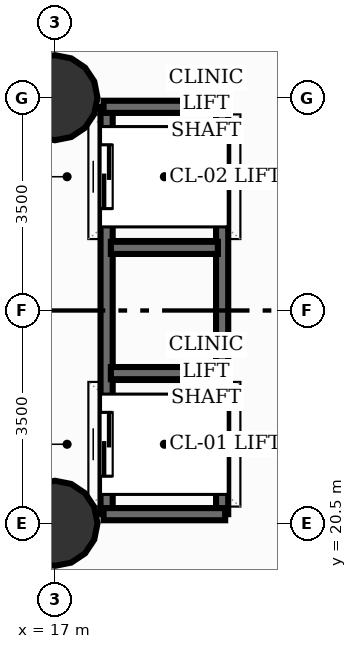
"""IFC4 building model, lengths in metres.
Left out: names, types, materials, properties, quantities, classifications, styles, units other than length and angle.
Written with IfcOpenShell. Run it as: python <this file> out.ifc"""

import sys

from ifc_helpers import new_model, si_unit, direction, frame, frame_2d, origin, origin_2d, place, context, subcontext, project, spatial, rectangle, circle, extrude, element, fill, save


model = new_model("IFC4")
c1 = context("Model", 3, precision=1e-05, world=origin(), true_north=direction((0.0, 1.0)))
c2 = subcontext(c1, "Body", "Model", "MODEL_VIEW")
j1 = project(units=[si_unit("LENGTHUNIT", "METRE"), si_unit("PLANEANGLEUNIT", "RADIAN")], contexts=[c1])
p1 = place(None, origin())
s1 = spatial("IfcSite", under=j1, at=p1, CompositionType="ELEMENT")
p2 = place(p1, origin())
s2 = spatial("IfcBuilding", under=s1, at=p2, CompositionType="ELEMENT")
p3 = place(p2, frame((0.0, 0.0, -9.0)))
s3 = spatial("IfcBuildingStorey", under=s2, at=p3, CompositionType="ELEMENT", Elevation=-9.0)
for number, where, z_axis, x_axis in (
    (1, (17.0, 20.5, 0.0), (0.0, 0.0, 1.0), (1.0, 0.0, 0.0)),
    (2, (17.0, 27.5, 0.0), (0.0, 0.0, 1.0), (1.0, 0.0, 0.0)),
):
    element("IfcColumn", number, at=place(p3, frame(where, z_axis=z_axis, x_axis=x_axis)), inside=s3, PredefinedType="COLUMN", context=c2, shape_type="SweptSolid", body=[
        extrude(circle(Radius=0.7, at=origin_2d()), origin(), (0.0, 0.0, 1.0), 4.5),
    ])
p4 = place(p3, frame((17.85, 20.65, 0.0), z_axis=(0.0, 0.0, 1.0), x_axis=(0.0, 1.0, 0.0)))
e3 = element("IfcWall", 3, at=p4, inside=s3, PredefinedType="SHEAR", context=c2, shape_type="SweptSolid", body=[
    extrude(rectangle(XDim=6.7, YDim=0.2, at=frame_2d((3.35, 0.0))), origin(), (0.0, 0.0, 1.0), 4.5),
])
p5 = place(p4, frame((0.625, 0.0, 0.0)))
e4 = element("IfcOpeningElement", 4, at=p5, cuts=e3, PredefinedType="OPENING", context=c2, shape_type="SweptSolid", body=[
    extrude(rectangle(XDim=1.05, YDim=2.15, at=frame_2d((0.525, 1.075))), frame((0.0, 0.11, 0.0), z_axis=(0.0, -1.0, 0.0), x_axis=(1.0, 0.0, 0.0)), (0.0, 0.0, 1.0), 0.22),
])
p6 = place(p4, frame((5.025, 0.0, 0.0)))
e5 = element("IfcOpeningElement", 5, at=p6, cuts=e3, PredefinedType="OPENING", context=c2, shape_type="SweptSolid", body=[
    extrude(rectangle(XDim=1.05, YDim=2.15, at=frame_2d((0.525, 1.075))), frame((0.0, 0.11, 0.0), z_axis=(0.0, -1.0, 0.0), x_axis=(1.0, 0.0, 0.0)), (0.0, 0.0, 1.0), 0.22),
])
p7 = place(p3, frame((19.75, 20.65, 0.0), z_axis=(0.0, 0.0, 1.0), x_axis=(0.0, 1.0, 0.0)))
e6 = element("IfcWall", 6, at=p7, inside=s3, PredefinedType="SHEAR", context=c2, shape_type="SweptSolid", body=[
    extrude(rectangle(XDim=6.7, YDim=0.2, at=frame_2d((3.35, 0.0))), origin(), (0.0, 0.0, 1.0), 4.5),
])
for number, where, z_axis, x_axis in (
    (7, (17.8, 20.65, 0.0), (0.0, 0.0, 1.0), (1.0, 0.0, 0.0)),
    (8, (17.8, 27.35, 0.0), (0.0, 0.0, 1.0), (1.0, 0.0, 0.0)),
):
    element("IfcWall", number, at=place(p3, frame(where, z_axis=z_axis, x_axis=x_axis)), inside=s3, PredefinedType="SHEAR", context=c2, shape_type="SweptSolid", body=[
        extrude(rectangle(XDim=2.0, YDim=0.2, at=frame_2d((1.0, 0.0))), origin(), (0.0, 0.0, 1.0), 4.5),
    ])
for number, where, z_axis, x_axis in (
    (9, (17.92, 22.97, 0.0), (0.0, 0.0, 1.0), (1.0, 0.0, 0.0)),
    (10, (17.92, 25.03, 0.0), (0.0, 0.0, 1.0), (1.0, 0.0, 0.0)),
):
    element("IfcWall", number, at=place(p3, frame(where, z_axis=z_axis, x_axis=x_axis)), inside=s3, PredefinedType="SHEAR", context=c2, shape_type="SweptSolid", body=[
        extrude(rectangle(XDim=1.76, YDim=0.2, at=frame_2d((0.88, 0.0))), origin(), (0.0, 0.0, 1.0), 4.5),
    ])
p8 = place(p5, origin())
e11 = element("IfcDoor", 11, at=p8, inside=s3, OperationType="DOUBLE_DOOR_SLIDING", PredefinedType="DOOR", context=c2, shape_type="SweptSolid", body=[
    extrude(rectangle(XDim=1.05, YDim=2.15, at=frame_2d((0.525, 1.075))), frame((0.0, 0.025, 0.0), z_axis=(0.0, -1.0, 0.0), x_axis=(1.0, 0.0, 0.0)), (0.0, 0.0, 1.0), 0.05),
])
fill(e4, e11)
p9 = place(p6, origin())
e12 = element("IfcDoor", 12, at=p9, inside=s3, OperationType="DOUBLE_DOOR_SLIDING", PredefinedType="DOOR", context=c2, shape_type="SweptSolid", body=[
    extrude(rectangle(XDim=1.05, YDim=2.15, at=frame_2d((0.525, 1.075))), frame((0.0, 0.025, 0.0), z_axis=(0.0, -1.0, 0.0), x_axis=(1.0, 0.0, 0.0)), (0.0, 0.0, 1.0), 0.05),
])
fill(e5, e12)
save(model, sys.argv[1])
